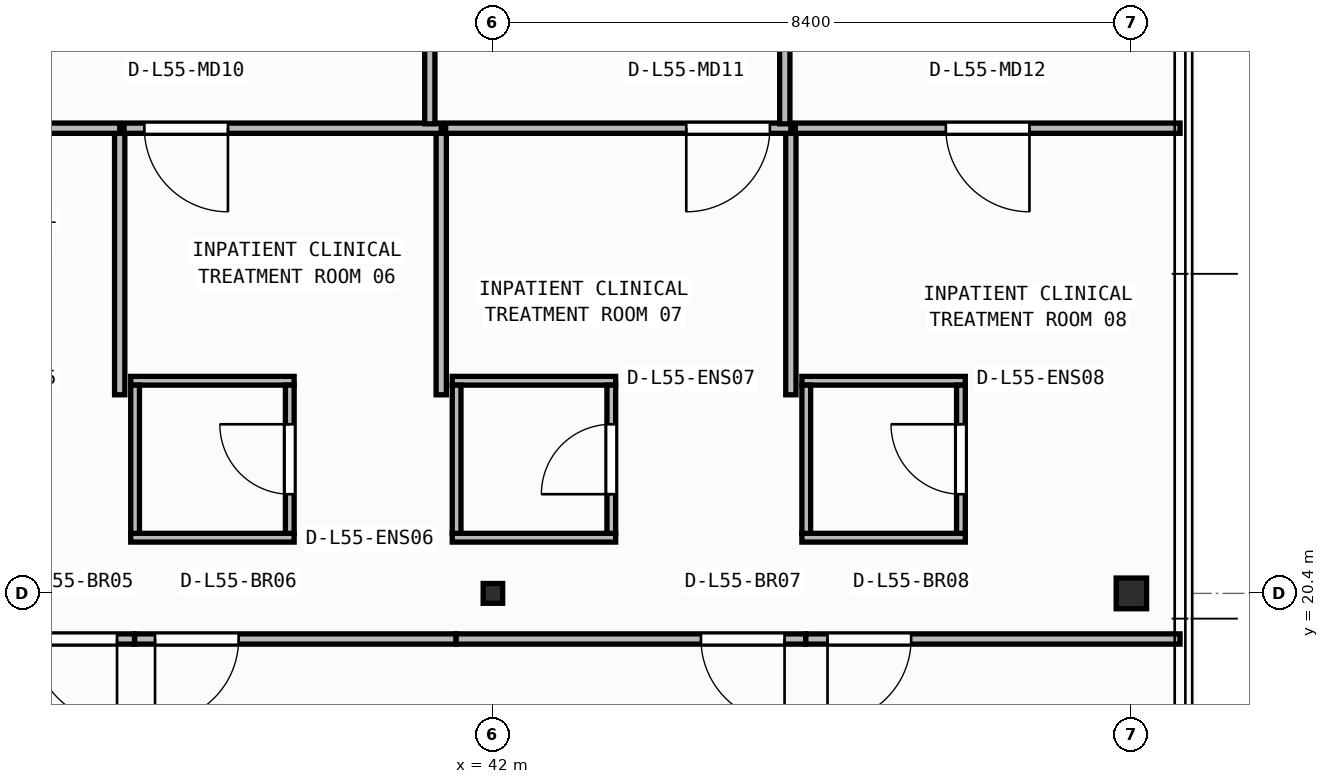
"""IFC4 building model, lengths in metres.
Left out: names, types, materials, properties, quantities, classifications, styles, units other than length and angle.
Written with IfcOpenShell. Run it as: python <this file> out.ifc"""

import sys

from ifc_helpers import new_model, si_unit, direction, frame, frame_2d, origin, origin_2d, place, context, subcontext, project, spatial, rectangle, i_section, extrude, element, fill, save


model = new_model("IFC4")
c1 = context("Model", 3, precision=1e-05, world=origin(), true_north=direction((0.0, 1.0)))
c2 = subcontext(c1, "Body", "Model", "MODEL_VIEW")
j1 = project(units=[si_unit("LENGTHUNIT", "METRE"), si_unit("PLANEANGLEUNIT", "RADIAN")], contexts=[c1])
p1 = place(None, origin())
s1 = spatial("IfcSite", under=j1, at=p1, CompositionType="ELEMENT")
p2 = place(p1, origin())
s2 = spatial("IfcBuilding", under=s1, at=p2, CompositionType="ELEMENT")
p3 = place(p2, frame((0.0, 0.0, 223.7)))
s3 = spatial("IfcBuildingStorey", under=s2, at=p3, CompositionType="ELEMENT", Elevation=223.7)
p4 = place(p3, frame((42.0, 20.4, 0.0), z_axis=(0.0, 0.0, 1.0), x_axis=(1.0, 0.0, 0.0)))
e1 = element("IfcColumn", 1, at=p4, inside=s3, PredefinedType="COLUMN", context=c2, shape_type="SweptSolid", body=[
    extrude(i_section(OverallWidth=0.256, OverallDepth=0.26, WebThickness=0.01, FlangeThickness=0.017, FilletRadius=0.013, at=origin_2d()), origin(), (0.0, 0.0, 1.0), 3.95),
])
p5 = place(p3, frame((50.4, 20.4, 0.0), z_axis=(0.0, 0.0, 1.0), x_axis=(1.0, 0.0, 0.0)))
e2 = element("IfcColumn", 2, at=p5, inside=s3, PredefinedType="COLUMN", context=c2, shape_type="SweptSolid", body=[
    extrude(i_section(OverallWidth=0.4, OverallDepth=0.404, WebThickness=0.02, FlangeThickness=0.032, at=origin_2d()), origin(), (0.0, 0.0, 1.0), 3.95),
])
for number, where, z_axis, x_axis in (
    (3, (37.235, 21.133, 0.0), (0.0, 0.0, 1.0), (1.0, 0.0, 0.0)),
    (4, (37.235, 23.198, 0.0), (0.0, 0.0, 1.0), (1.0, 0.0, 0.0)),
):
    element("IfcWall", number, at=place(p3, frame(where, z_axis=z_axis, x_axis=x_axis)), inside=s3, PredefinedType="PARTITIONING", context=c2, shape_type="SweptSolid", body=[
        extrude(rectangle(XDim=2.15, YDim=0.115, at=frame_2d((1.075, 0.0))), origin(), (0.0, 0.0, 1.0), 3.71),
    ])
p6 = place(p3, frame((37.292, 21.19, 0.0), z_axis=(0.0, 0.0, 1.0), x_axis=(0.0, 1.0, 0.0)))
e5 = element("IfcWall", 5, at=p6, inside=s3, PredefinedType="PARTITIONING", context=c2, shape_type="SweptSolid", body=[
    extrude(rectangle(XDim=1.95, YDim=0.115, at=frame_2d((0.975, 0.0))), origin(), (0.0, 0.0, 1.0), 3.71),
])
p7 = place(p3, frame((39.327, 21.19, 0.0), z_axis=(0.0, 0.0, 1.0), x_axis=(0.0, 1.0, 0.0)))
e6 = element("IfcWall", 6, at=p7, inside=s3, PredefinedType="PARTITIONING", context=c2, shape_type="SweptSolid", body=[
    extrude(rectangle(XDim=1.95, YDim=0.115, at=frame_2d((0.975, 0.0))), origin(), (0.0, 0.0, 1.0), 3.71),
])
p8 = place(p7, frame((0.515, 0.0, 0.0)))
e7 = element("IfcOpeningElement", 7, at=p8, cuts=e6, PredefinedType="OPENING", context=c2, shape_type="SweptSolid", body=[
    extrude(rectangle(XDim=0.92, YDim=2.1, at=frame_2d((0.46, 1.05))), frame((0.0, 0.067, 0.0), z_axis=(0.0, -1.0, 0.0), x_axis=(1.0, 0.0, 0.0)), (0.0, 0.0, 1.0), 0.135),
])
for number, where, z_axis, x_axis in (
    (8, (41.465, 21.133, 0.0), (0.0, 0.0, 1.0), (1.0, 0.0, 0.0)),
    (9, (41.465, 23.198, 0.0), (0.0, 0.0, 1.0), (1.0, 0.0, 0.0)),
):
    element("IfcWall", number, at=place(p3, frame(where, z_axis=z_axis, x_axis=x_axis)), inside=s3, PredefinedType="PARTITIONING", context=c2, shape_type="SweptSolid", body=[
        extrude(rectangle(XDim=2.15, YDim=0.115, at=frame_2d((1.075, 0.0))), origin(), (0.0, 0.0, 1.0), 3.71),
    ])
p9 = place(p3, frame((41.522, 21.19, 0.0), z_axis=(0.0, 0.0, 1.0), x_axis=(0.0, 1.0, 0.0)))
e10 = element("IfcWall", 10, at=p9, inside=s3, PredefinedType="PARTITIONING", context=c2, shape_type="SweptSolid", body=[
    extrude(rectangle(XDim=1.95, YDim=0.115, at=frame_2d((0.975, 0.0))), origin(), (0.0, 0.0, 1.0), 3.157),
])
p10 = place(p3, frame((43.558, 21.19, 0.0), z_axis=(0.0, 0.0, 1.0), x_axis=(0.0, 1.0, 0.0)))
e11 = element("IfcWall", 11, at=p10, inside=s3, PredefinedType="PARTITIONING", context=c2, shape_type="SweptSolid", body=[
    extrude(rectangle(XDim=1.95, YDim=0.115, at=frame_2d((0.975, 0.0))), origin(), (0.0, 0.0, 1.0), 3.71),
])
p11 = place(p10, frame((0.515, 0.0, 0.0)))
e12 = element("IfcOpeningElement", 12, at=p11, cuts=e11, PredefinedType="OPENING", context=c2, shape_type="SweptSolid", body=[
    extrude(rectangle(XDim=0.92, YDim=2.1, at=frame_2d((0.46, 1.05))), frame((0.0, 0.067, 0.0), z_axis=(0.0, -1.0, 0.0), x_axis=(1.0, 0.0, 0.0)), (0.0, 0.0, 1.0), 0.135),
])
for number, where, z_axis, x_axis in (
    (13, (46.065, 21.133, 0.0), (0.0, 0.0, 1.0), (1.0, 0.0, 0.0)),
    (14, (46.065, 23.198, 0.0), (0.0, 0.0, 1.0), (1.0, 0.0, 0.0)),
):
    element("IfcWall", number, at=place(p3, frame(where, z_axis=z_axis, x_axis=x_axis)), inside=s3, PredefinedType="PARTITIONING", context=c2, shape_type="SweptSolid", body=[
        extrude(rectangle(XDim=2.15, YDim=0.115, at=frame_2d((1.075, 0.0))), origin(), (0.0, 0.0, 1.0), 3.71),
    ])
p12 = place(p3, frame((46.123, 21.19, 0.0), z_axis=(0.0, 0.0, 1.0), x_axis=(0.0, 1.0, 0.0)))
e15 = element("IfcWall", 15, at=p12, inside=s3, PredefinedType="PARTITIONING", context=c2, shape_type="SweptSolid", body=[
    extrude(rectangle(XDim=1.95, YDim=0.115, at=frame_2d((0.975, 0.0))), origin(), (0.0, 0.0, 1.0), 3.71),
])
p13 = place(p3, frame((48.157, 21.19, 0.0), z_axis=(0.0, 0.0, 1.0), x_axis=(0.0, 1.0, 0.0)))
e16 = element("IfcWall", 16, at=p13, inside=s3, PredefinedType="PARTITIONING", context=c2, shape_type="SweptSolid", body=[
    extrude(rectangle(XDim=1.95, YDim=0.115, at=frame_2d((0.975, 0.0))), origin(), (0.0, 0.0, 1.0), 3.71),
])
p14 = place(p13, frame((0.515, 0.0, 0.0)))
e17 = element("IfcOpeningElement", 17, at=p14, cuts=e16, PredefinedType="OPENING", context=c2, shape_type="SweptSolid", body=[
    extrude(rectangle(XDim=0.92, YDim=2.1, at=frame_2d((0.46, 1.05))), frame((0.0, 0.067, 0.0), z_axis=(0.0, -1.0, 0.0), x_axis=(1.0, 0.0, 0.0)), (0.0, 0.0, 1.0), 0.135),
])
p15 = place(p3, frame((37.285, 19.8, 0.0), z_axis=(0.0, 0.0, 1.0), x_axis=(-1.0, 0.0, 0.0)))
e18 = element("IfcWall", 18, at=p15, inside=s3, PredefinedType="PARTITIONING", context=c2, shape_type="SweptSolid", body=[
    extrude(rectangle(XDim=2.687, YDim=0.135, at=frame_2d((1.344, 0.0))), origin(), (0.0, 0.0, 1.0), 3.71),
])
p16 = place(p15, frame((0.23, 0.0, 0.0)))
e19 = element("IfcOpeningElement", 19, at=p16, cuts=e18, PredefinedType="OPENING", context=c2, shape_type="SweptSolid", body=[
    extrude(rectangle(XDim=1.1, YDim=2.1, at=frame_2d((0.55, 1.05))), frame((0.0, 0.077, 0.0), z_axis=(0.0, -1.0, 0.0), x_axis=(1.0, 0.0, 0.0)), (0.0, 0.0, 1.0), 0.155),
])
p17 = place(p3, frame((41.515, 19.8, 0.0), z_axis=(0.0, 0.0, 1.0), x_axis=(-1.0, 0.0, 0.0)))
e20 = element("IfcWall", 20, at=p17, inside=s3, PredefinedType="PARTITIONING", context=c2, shape_type="SweptSolid", body=[
    extrude(rectangle(XDim=4.228, YDim=0.135, at=frame_2d((2.114, 0.0))), origin(), (0.0, 0.0, 1.0), 3.71),
])
p18 = place(p17, frame((2.86, 0.0, 0.0)))
e21 = element("IfcOpeningElement", 21, at=p18, cuts=e20, PredefinedType="OPENING", context=c2, shape_type="SweptSolid", body=[
    extrude(rectangle(XDim=1.1, YDim=2.1, at=frame_2d((0.55, 1.05))), frame((0.0, 0.077, 0.0), z_axis=(0.0, -1.0, 0.0), x_axis=(1.0, 0.0, 0.0)), (0.0, 0.0, 1.0), 0.155),
])
p19 = place(p3, frame((46.115, 19.8, 0.0), z_axis=(0.0, 0.0, 1.0), x_axis=(-1.0, 0.0, 0.0)))
e22 = element("IfcWall", 22, at=p19, inside=s3, PredefinedType="PARTITIONING", context=c2, shape_type="SweptSolid", body=[
    extrude(rectangle(XDim=4.598, YDim=0.135, at=frame_2d((2.299, 0.0))), origin(), (0.0, 0.0, 1.0), 3.71),
])
p20 = place(p19, frame((0.278, 0.0, 0.0)))
e23 = element("IfcOpeningElement", 23, at=p20, cuts=e22, PredefinedType="OPENING", context=c2, shape_type="SweptSolid", body=[
    extrude(rectangle(XDim=1.1, YDim=2.1, at=frame_2d((0.55, 1.05))), frame((0.0, 0.077, 0.0), z_axis=(0.0, -1.0, 0.0), x_axis=(1.0, 0.0, 0.0)), (0.0, 0.0, 1.0), 0.155),
])
p21 = place(p3, frame((51.04, 19.8, 0.0), z_axis=(0.0, 0.0, 1.0), x_axis=(-1.0, 0.0, 0.0)))
e24 = element("IfcWall", 24, at=p21, inside=s3, PredefinedType="PARTITIONING", context=c2, shape_type="SweptSolid", body=[
    extrude(rectangle(XDim=4.923, YDim=0.135, at=frame_2d((2.462, 0.0))), origin(), (0.0, 0.0, 1.0), 3.71),
])
p22 = place(p21, frame((3.538, 0.0, 0.0)))
e25 = element("IfcOpeningElement", 25, at=p22, cuts=e24, PredefinedType="OPENING", context=c2, shape_type="SweptSolid", body=[
    extrude(rectangle(XDim=1.1, YDim=2.1, at=frame_2d((0.55, 1.05))), frame((0.0, 0.077, 0.0), z_axis=(0.0, -1.0, 0.0), x_axis=(1.0, 0.0, 0.0)), (0.0, 0.0, 1.0), 0.155),
])
p23 = place(p3, frame((37.09, 23.012, 0.0), z_axis=(0.0, 0.0, 1.0), x_axis=(0.0, 1.0, 0.0)))
e26 = element("IfcWall", 26, at=p23, inside=s3, PredefinedType="PARTITIONING", context=c2, shape_type="SweptSolid", body=[
    extrude(rectangle(XDim=3.508, YDim=0.135, at=frame_2d((1.754, 0.0))), origin(), (0.0, 0.0, 1.0), 3.71),
])
p24 = place(p3, frame((37.09, 26.52, 0.0), z_axis=(0.0, 0.0, 1.0), x_axis=(-1.0, 0.0, 0.0)))
e27 = element("IfcWall", 27, at=p24, inside=s3, PredefinedType="PARTITIONING", context=c2, shape_type="SweptSolid", body=[
    extrude(rectangle(XDim=1.203, YDim=0.135, at=frame_2d((0.602, 0.0))), origin(), (0.0, 0.0, 1.0), 3.71),
])
p25 = place(p3, frame((41.32, 23.012, 0.0), z_axis=(0.0, 0.0, 1.0), x_axis=(0.0, 1.0, 0.0)))
e28 = element("IfcWall", 28, at=p25, inside=s3, PredefinedType="PARTITIONING", context=c2, shape_type="SweptSolid", body=[
    extrude(rectangle(XDim=3.508, YDim=0.135, at=frame_2d((1.754, 0.0))), origin(), (0.0, 0.0, 1.0), 3.71),
])
p26 = place(p3, frame((41.32, 26.52, 0.0), z_axis=(0.0, 0.0, 1.0), x_axis=(-1.0, 0.0, 0.0)))
e29 = element("IfcWall", 29, at=p26, inside=s3, PredefinedType="PARTITIONING", context=c2, shape_type="SweptSolid", body=[
    extrude(rectangle(XDim=4.173, YDim=0.135, at=frame_2d((2.086, 0.0))), origin(), (0.0, 0.0, 1.0), 3.71),
])
p27 = place(p26, frame((2.806, 0.0, 0.0)))
e30 = element("IfcOpeningElement", 30, at=p27, cuts=e29, PredefinedType="OPENING", context=c2, shape_type="SweptSolid", body=[
    extrude(rectangle(XDim=1.1, YDim=2.1, at=frame_2d((0.55, 1.05))), frame((0.0, 0.077, 0.0), z_axis=(0.0, -1.0, 0.0), x_axis=(1.0, 0.0, 0.0)), (0.0, 0.0, 1.0), 0.155),
])
p28 = place(p3, frame((45.92, 23.012, 0.0), z_axis=(0.0, 0.0, 1.0), x_axis=(0.0, 1.0, 0.0)))
e31 = element("IfcWall", 31, at=p28, inside=s3, PredefinedType="PARTITIONING", context=c2, shape_type="SweptSolid", body=[
    extrude(rectangle(XDim=3.508, YDim=0.135, at=frame_2d((1.754, 0.0))), origin(), (0.0, 0.0, 1.0), 3.71),
])
p29 = place(p3, frame((45.92, 26.52, 0.0), z_axis=(0.0, 0.0, 1.0), x_axis=(-1.0, 0.0, 0.0)))
e32 = element("IfcWall", 32, at=p29, inside=s3, PredefinedType="PARTITIONING", context=c2, shape_type="SweptSolid", body=[
    extrude(rectangle(XDim=4.542, YDim=0.135, at=frame_2d((2.271, 0.0))), origin(), (0.0, 0.0, 1.0), 3.71),
])
p30 = place(p29, frame((0.276, 0.0, 0.0)))
e33 = element("IfcOpeningElement", 33, at=p30, cuts=e32, PredefinedType="OPENING", context=c2, shape_type="SweptSolid", body=[
    extrude(rectangle(XDim=1.1, YDim=2.1, at=frame_2d((0.55, 1.05))), frame((0.0, 0.077, 0.0), z_axis=(0.0, -1.0, 0.0), x_axis=(1.0, 0.0, 0.0)), (0.0, 0.0, 1.0), 0.155),
])
p31 = place(p3, frame((51.04, 26.52, 0.0), z_axis=(0.0, 0.0, 1.0), x_axis=(-1.0, 0.0, 0.0)))
e34 = element("IfcWall", 34, at=p31, inside=s3, PredefinedType="PARTITIONING", context=c2, shape_type="SweptSolid", body=[
    extrude(rectangle(XDim=5.062, YDim=0.135, at=frame_2d((2.531, 0.0))), origin(), (0.0, 0.0, 1.0), 3.71),
])
p32 = place(p31, frame((1.981, 0.0, 0.0)))
e35 = element("IfcOpeningElement", 35, at=p32, cuts=e34, PredefinedType="OPENING", context=c2, shape_type="SweptSolid", body=[
    extrude(rectangle(XDim=1.1, YDim=2.1, at=frame_2d((0.55, 1.05))), frame((0.0, 0.077, 0.0), z_axis=(0.0, -1.0, 0.0), x_axis=(1.0, 0.0, 0.0)), (0.0, 0.0, 1.0), 0.155),
])
p33 = place(p3, frame((41.17, 26.577, 0.0), z_axis=(0.0, 0.0, 1.0), x_axis=(0.0, 1.0, 0.0)))
e36 = element("IfcWall", 36, at=p33, inside=s3, PredefinedType="PARTITIONING", context=c2, shape_type="SweptSolid", body=[
    extrude(rectangle(XDim=4.55, YDim=0.135, at=frame_2d((2.275, 0.0))), origin(), (0.0, 0.0, 1.0), 3.71),
])
p34 = place(p3, frame((45.84, 26.577, 0.0), z_axis=(0.0, 0.0, 1.0), x_axis=(0.0, 1.0, 0.0)))
e37 = element("IfcWall", 37, at=p34, inside=s3, PredefinedType="PARTITIONING", context=c2, shape_type="SweptSolid", body=[
    extrude(rectangle(XDim=4.868, YDim=0.135, at=frame_2d((2.434, 0.0))), origin(), (0.0, 0.0, 1.0), 3.71),
])
p35 = place(p8, origin())
e38 = element("IfcDoor", 38, at=p35, inside=s3, OperationType="SINGLE_SWING_RIGHT", PredefinedType="DOOR", context=c2, shape_type="SweptSolid", body=[
    extrude(rectangle(XDim=0.92, YDim=2.1, at=frame_2d((0.46, 1.05))), frame((0.0, 0.025, 0.0), z_axis=(0.0, -1.0, 0.0), x_axis=(1.0, 0.0, 0.0)), (0.0, 0.0, 1.0), 0.05),
])
fill(e7, e38)
p36 = place(p11, origin())
e39 = element("IfcDoor", 39, at=p36, inside=s3, OperationType="SINGLE_SWING_LEFT", PredefinedType="DOOR", context=c2, shape_type="SweptSolid", body=[
    extrude(rectangle(XDim=0.92, YDim=2.1, at=frame_2d((0.46, 1.05))), frame((0.0, 0.025, 0.0), z_axis=(0.0, -1.0, 0.0), x_axis=(1.0, 0.0, 0.0)), (0.0, 0.0, 1.0), 0.05),
])
fill(e12, e39)
p37 = place(p14, origin())
e40 = element("IfcDoor", 40, at=p37, inside=s3, OperationType="SINGLE_SWING_RIGHT", PredefinedType="DOOR", context=c2, shape_type="SweptSolid", body=[
    extrude(rectangle(XDim=0.92, YDim=2.1, at=frame_2d((0.46, 1.05))), frame((0.0, 0.025, 0.0), z_axis=(0.0, -1.0, 0.0), x_axis=(1.0, 0.0, 0.0)), (0.0, 0.0, 1.0), 0.05),
])
fill(e17, e40)
p38 = place(p16, origin())
e41 = element("IfcDoor", 41, at=p38, inside=s3, OperationType="SINGLE_SWING_LEFT", PredefinedType="DOOR", context=c2, shape_type="SweptSolid", body=[
    extrude(rectangle(XDim=1.1, YDim=2.1, at=frame_2d((0.55, 1.05))), frame((0.0, 0.025, 0.0), z_axis=(0.0, -1.0, 0.0), x_axis=(1.0, 0.0, 0.0)), (0.0, 0.0, 1.0), 0.05),
])
fill(e19, e41)
p39 = place(p18, origin())
e42 = element("IfcDoor", 42, at=p39, inside=s3, OperationType="SINGLE_SWING_RIGHT", PredefinedType="DOOR", context=c2, shape_type="SweptSolid", body=[
    extrude(rectangle(XDim=1.1, YDim=2.1, at=frame_2d((0.55, 1.05))), frame((0.0, 0.025, 0.0), z_axis=(0.0, -1.0, 0.0), x_axis=(1.0, 0.0, 0.0)), (0.0, 0.0, 1.0), 0.05),
])
fill(e21, e42)
p40 = place(p20, origin())
e43 = element("IfcDoor", 43, at=p40, inside=s3, OperationType="SINGLE_SWING_LEFT", PredefinedType="DOOR", context=c2, shape_type="SweptSolid", body=[
    extrude(rectangle(XDim=1.1, YDim=2.1, at=frame_2d((0.55, 1.05))), frame((0.0, 0.025, 0.0), z_axis=(0.0, -1.0, 0.0), x_axis=(1.0, 0.0, 0.0)), (0.0, 0.0, 1.0), 0.05),
])
fill(e23, e43)
p41 = place(p22, origin())
e44 = element("IfcDoor", 44, at=p41, inside=s3, OperationType="SINGLE_SWING_RIGHT", PredefinedType="DOOR", context=c2, shape_type="SweptSolid", body=[
    extrude(rectangle(XDim=1.1, YDim=2.1, at=frame_2d((0.55, 1.05))), frame((0.0, 0.025, 0.0), z_axis=(0.0, -1.0, 0.0), x_axis=(1.0, 0.0, 0.0)), (0.0, 0.0, 1.0), 0.05),
])
fill(e25, e44)
p42 = place(p27, origin())
e45 = element("IfcDoor", 45, at=p42, inside=s3, OperationType="SINGLE_SWING_LEFT", PredefinedType="DOOR", context=c2, shape_type="SweptSolid", body=[
    extrude(rectangle(XDim=1.1, YDim=2.1, at=frame_2d((0.55, 1.05))), frame((0.0, 0.025, 0.0), z_axis=(0.0, -1.0, 0.0), x_axis=(1.0, 0.0, 0.0)), (0.0, 0.0, 1.0), 0.05),
])
fill(e30, e45)
p43 = place(p30, origin())
e46 = element("IfcDoor", 46, at=p43, inside=s3, OperationType="SINGLE_SWING_RIGHT", PredefinedType="DOOR", context=c2, shape_type="SweptSolid", body=[
    extrude(rectangle(XDim=1.1, YDim=2.1, at=frame_2d((0.55, 1.05))), frame((0.0, 0.025, 0.0), z_axis=(0.0, -1.0, 0.0), x_axis=(1.0, 0.0, 0.0)), (0.0, 0.0, 1.0), 0.05),
])
fill(e33, e46)
p44 = place(p32, origin())
e47 = element("IfcDoor", 47, at=p44, inside=s3, OperationType="SINGLE_SWING_LEFT", PredefinedType="DOOR", context=c2, shape_type="SweptSolid", body=[
    extrude(rectangle(XDim=1.1, YDim=2.1, at=frame_2d((0.55, 1.05))), frame((0.0, 0.025, 0.0), z_axis=(0.0, -1.0, 0.0), x_axis=(1.0, 0.0, 0.0)), (0.0, 0.0, 1.0), 0.05),
])
fill(e35, e47)
save(model, sys.argv[1])
